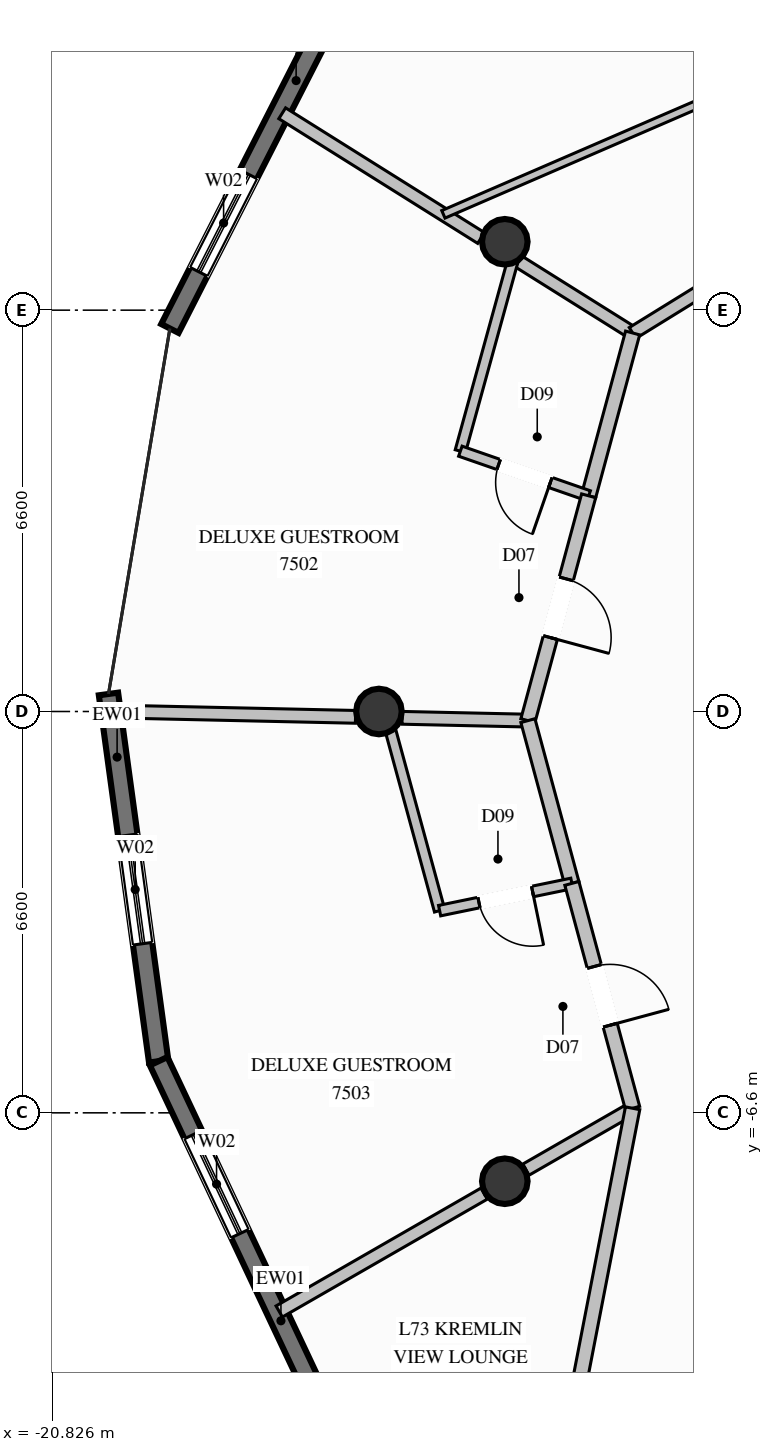
"""IFC4 building model, lengths in metres.
Left out: names, types, materials, properties, quantities, classifications, styles, units other than length and angle.
Written with IfcOpenShell. Run it as: python <this file> out.ifc"""

import sys

from ifc_helpers import new_model, si_unit, direction, frame, frame_2d, origin, origin_2d, place, context, subcontext, project, spatial, rectangle, circle, extrude, element, fill, save


model = new_model("IFC4")
c1 = context("Model", 3, precision=1e-05, world=origin(), true_north=direction((0.0, 1.0)))
c2 = subcontext(c1, "Body", "Model", "MODEL_VIEW")
j1 = project(units=[si_unit("LENGTHUNIT", "METRE"), si_unit("PLANEANGLEUNIT", "RADIAN")], contexts=[c1])
p1 = place(None, origin())
s1 = spatial("IfcSite", under=j1, at=p1, CompositionType="ELEMENT")
p2 = place(p1, origin())
s2 = spatial("IfcBuilding", under=s1, at=p2, CompositionType="ELEMENT")
p3 = place(p2, frame((0.0, 0.0, 282.0)))
s3 = spatial("IfcBuildingStorey", under=s2, at=p3, CompositionType="ELEMENT", Elevation=282.0)
for number, where, z_axis, x_axis in (
    (1, (-13.38, 7.725, 0.0), (0.0, 0.0, 1.0), (1.0, 0.0, 0.0)),
    (2, (-15.45, 0.0, 0.0), (0.0, 0.0, 1.0), (1.0, 0.0, 0.0)),
    (3, (-13.38, -7.725, 0.0), (0.0, 0.0, 1.0), (1.0, 0.0, 0.0)),
):
    element("IfcColumn", number, at=place(p3, frame(where, z_axis=z_axis, x_axis=x_axis)), inside=s3, PredefinedType="COLUMN", context=c2, shape_type="SweptSolid", body=[
        extrude(circle(Radius=0.375, at=origin_2d()), origin(), (0.0, 0.0, 1.0), 3.8),
    ])
p4 = place(p3, frame((-18.888, 6.299, 0.0), z_axis=(0.0, 0.0, 1.0), x_axis=(0.453783790234, 0.891111817743, 0.0)))
e4 = element("IfcWall", 4, at=p4, inside=s3, PredefinedType="SOLIDWALL", context=c2, shape_type="SweptSolid", body=[
    extrude(rectangle(XDim=6.053, YDim=0.32, at=frame_2d((3.027, 0.0))), origin(), (0.0, 0.0, 1.0), 3.57),
])
p5 = place(p4, frame((1.046, 0.0, 0.35)))
e5 = element("IfcOpeningElement", 5, at=p5, cuts=e4, PredefinedType="OPENING", context=c2, shape_type="SweptSolid", body=[
    extrude(rectangle(XDim=1.8, YDim=2.6, at=frame_2d((0.9, 1.3))), frame((0.0, 0.17, 0.0), z_axis=(0.0, -1.0, 0.0), x_axis=(1.0, 0.0, 0.0)), (0.0, 0.0, 1.0), 0.34),
])
p6 = place(p3, frame((-19.073, -5.751, 0.0), z_axis=(0.0, 0.0, 1.0), x_axis=(-0.135345568291, 0.990798454351, 0.0)))
e6 = element("IfcWall", 6, at=p6, inside=s3, PredefinedType="SOLIDWALL", context=c2, shape_type="SweptSolid", body=[
    extrude(rectangle(XDim=6.095, YDim=0.32, at=frame_2d((3.048, 0.0))), origin(), (0.0, 0.0, 1.0), 3.57),
])
p7 = place(p6, frame((1.95, 0.0, 0.35)))
e7 = element("IfcOpeningElement", 7, at=p7, cuts=e6, PredefinedType="OPENING", context=c2, shape_type="SweptSolid", body=[
    extrude(rectangle(XDim=1.8, YDim=2.6, at=frame_2d((0.9, 1.3))), frame((0.0, 0.17, 0.0), z_axis=(0.0, -1.0, 0.0), x_axis=(1.0, 0.0, 0.0)), (0.0, 0.0, 1.0), 0.34),
])
p8 = place(p3, frame((-16.493, -11.227, 0.0), z_axis=(0.0, 0.0, 1.0), x_axis=(-0.4262165229, 0.904621177956, 0.0)))
e8 = element("IfcWall", 8, at=p8, inside=s3, PredefinedType="SOLIDWALL", context=c2, shape_type="SweptSolid", body=[
    extrude(rectangle(XDim=6.053, YDim=0.32, at=frame_2d((3.027, 0.0))), origin(), (0.0, 0.0, 1.0), 3.57),
])
p9 = place(p8, frame((2.919, 0.0, 0.35)))
e9 = element("IfcOpeningElement", 9, at=p9, cuts=e8, PredefinedType="OPENING", context=c2, shape_type="SweptSolid", body=[
    extrude(rectangle(XDim=1.8, YDim=2.6, at=frame_2d((0.9, 1.3))), frame((0.0, 0.17, 0.0), z_axis=(0.0, -1.0, 0.0), x_axis=(1.0, 0.0, 0.0)), (0.0, 0.0, 1.0), 0.34),
])
p10 = place(p3, frame((-11.278, 6.225, 0.0), z_axis=(0.0, 0.0, 1.0), x_axis=(-0.847328563413, 0.531069021525, 0.0)))
e10 = element("IfcWall", 10, at=p10, inside=s3, PredefinedType="PARTITIONING", context=c2, shape_type="SweptSolid", body=[
    extrude(rectangle(XDim=2.214, YDim=0.21, at=frame_2d((1.107, 0.0))), origin(), (0.0, 0.0, 1.0), 3.085),
])
p11 = place(p3, frame((-13.77, 7.787, 0.0), z_axis=(0.0, 0.0, 1.0), x_axis=(-0.847251407525, 0.531192105031, 0.0)))
e11 = element("IfcWall", 11, at=p11, inside=s3, PredefinedType="PARTITIONING", context=c2, shape_type="SweptSolid", body=[
    extrude(rectangle(XDim=3.861, YDim=0.21, at=frame_2d((1.93, 0.0))), origin(), (0.0, 0.0, 1.0), 3.57),
])
p12 = place(p3, frame((-13.0, -0.15, 0.0), z_axis=(0.0, 0.0, 1.0), x_axis=(-0.999754050443, 0.022177434983, 0.0)))
e12 = element("IfcWall", 12, at=p12, inside=s3, PredefinedType="PARTITIONING", context=c2, shape_type="SweptSolid", body=[
    extrude(rectangle(XDim=2.07, YDim=0.21, at=frame_2d((1.035, 0.0))), origin(), (0.0, 0.0, 1.0), 3.57),
])
p13 = place(p3, frame((-15.835, -0.088, 0.0), z_axis=(0.0, 0.0, 1.0), x_axis=(-0.999756763109, 0.022054809407, 0.0)))
e13 = element("IfcWall", 13, at=p13, inside=s3, PredefinedType="PARTITIONING", context=c2, shape_type="SweptSolid", body=[
    extrude(rectangle(XDim=3.985, YDim=0.21, at=frame_2d((1.993, 0.0))), origin(), (0.0, 0.0, 1.0), 3.57),
])
p14 = place(p3, frame((-11.278, -6.525, 0.0), z_axis=(0.0, 0.0, 1.0), x_axis=(-0.866822958738, -0.498616042867, 0.0)))
e14 = element("IfcWall", 14, at=p14, inside=s3, PredefinedType="PARTITIONING", context=c2, shape_type="SweptSolid", body=[
    extrude(rectangle(XDim=2.026, YDim=0.21, at=frame_2d((1.013, 0.0))), origin(), (0.0, 0.0, 1.0), 3.085),
])
p15 = place(p3, frame((-13.719, -7.928, 0.0), z_axis=(0.0, 0.0, 1.0), x_axis=(-0.866841187991, -0.49858435074, 0.0)))
e15 = element("IfcWall", 15, at=p15, inside=s3, PredefinedType="PARTITIONING", context=c2, shape_type="SweptSolid", body=[
    extrude(rectangle(XDim=3.889, YDim=0.21, at=frame_2d((1.944, 0.0))), origin(), (0.0, 0.0, 1.0), 3.57),
])
p16 = place(p3, frame((-11.278, 6.225, 0.0), z_axis=(0.0, 0.0, 1.0), x_axis=(0.85092385233, 0.525289060933, 0.0)))
e16 = element("IfcWall", 16, at=p16, inside=s3, PredefinedType="PARTITIONING", context=c2, shape_type="SweptSolid", body=[
    extrude(rectangle(XDim=4.616, YDim=0.21, at=frame_2d((2.308, 0.0))), origin(), (0.0, 0.0, 1.0), 3.57),
])
p17 = place(p3, frame((-14.39, 8.176, 0.0), z_axis=(0.0, 0.0, 1.0), x_axis=(0.917754899872, 0.397147257022, 0.0)))
e17 = element("IfcWall", 17, at=p17, inside=s3, PredefinedType="PARTITIONING", context=c2, shape_type="SweptSolid", body=[
    extrude(rectangle(XDim=15.679, YDim=0.135, at=frame_2d((7.84, 0.0))), origin(), (0.0, 0.0, 1.0), 3.57),
])
p18 = place(p17, frame((7.365, 0.0, 0.0)))
e18 = element("IfcOpeningElement", 18, at=p18, cuts=e17, PredefinedType="OPENING", context=c2, shape_type="SweptSolid", body=[
    extrude(rectangle(XDim=0.95, YDim=2.1, at=frame_2d((0.475, 1.05))), frame((0.0, 0.078, 0.0), z_axis=(0.0, -1.0, 0.0), x_axis=(1.0, 0.0, 0.0)), (0.0, 0.0, 1.0), 0.155),
])
p19 = place(p3, frame((-11.278, 6.225, 0.0), z_axis=(0.0, 0.0, 1.0), x_axis=(-0.260614169726, -0.965443035367, 0.0)))
e19 = element("IfcWall", 19, at=p19, inside=s3, PredefinedType="PARTITIONING", context=c2, shape_type="SweptSolid", body=[
    extrude(rectangle(XDim=2.774, YDim=0.24, at=frame_2d((1.387, 0.0))), origin(), (0.0, 0.0, 1.0), 3.57),
])
p20 = place(p3, frame((-13.237, 7.453, 0.0), z_axis=(0.0, 0.0, 1.0), x_axis=(-0.265653158595, -0.964068669405, 0.0)))
e20 = element("IfcWall", 20, at=p20, inside=s3, PredefinedType="PLUMBINGWALL", context=c2, shape_type="SweptSolid", body=[
    extrude(rectangle(XDim=3.29, YDim=0.175, at=frame_2d((1.645, 0.0))), origin(), (0.0, 0.0, 1.0), 3.137),
])
p21 = place(p3, frame((-12.001, 3.547, 0.0), z_axis=(0.0, 0.0, 1.0), x_axis=(-0.944505641949, 0.328495193764, 0.0)))
e21 = element("IfcWall", 21, at=p21, inside=s3, PredefinedType="PLUMBINGWALL", context=c2, shape_type="SweptSolid", body=[
    extrude(rectangle(XDim=2.234, YDim=0.175, at=frame_2d((1.117, 0.0))), origin(), (0.0, 0.0, 1.0), 3.57),
])
p22 = place(p21, frame((0.667, 0.0, 0.0)))
e22 = element("IfcOpeningElement", 22, at=p22, cuts=e21, PredefinedType="OPENING", context=c2, shape_type="SweptSolid", body=[
    extrude(rectangle(XDim=0.9, YDim=2.1, at=frame_2d((0.45, 1.05))), frame((0.0, 0.098, 0.0), z_axis=(0.0, -1.0, 0.0), x_axis=(1.0, 0.0, 0.0)), (0.0, 0.0, 1.0), 0.195),
])
p23 = place(p3, frame((-12.001, 3.547, 0.0), z_axis=(0.0, 0.0, 1.0), x_axis=(-0.260867276747, -0.96537467541, 0.0)))
e23 = element("IfcWall", 23, at=p23, inside=s3, PredefinedType="PARTITIONING", context=c2, shape_type="SweptSolid", body=[
    extrude(rectangle(XDim=3.83, YDim=0.24, at=frame_2d((1.915, 0.0))), origin(), (0.0, 0.0, 1.0), 3.57),
])
p24 = place(p23, frame((1.415, 0.0, 0.0)))
e24 = element("IfcOpeningElement", 24, at=p24, cuts=e23, PredefinedType="OPENING", context=c2, shape_type="SweptSolid", body=[
    extrude(rectangle(XDim=1.0, YDim=2.2, at=frame_2d((0.5, 1.1))), frame((0.0, 0.13, 0.0), z_axis=(0.0, -1.0, 0.0), x_axis=(1.0, 0.0, 0.0)), (0.0, 0.0, 1.0), 0.26),
])
p25 = place(p3, frame((-13.0, -0.15, 0.0), z_axis=(0.0, 0.0, 1.0), x_axis=(0.260702780503, -0.965419111183, 0.0)))
e25 = element("IfcWall", 25, at=p25, inside=s3, PredefinedType="PARTITIONING", context=c2, shape_type="SweptSolid", body=[
    extrude(rectangle(XDim=2.773, YDim=0.24, at=frame_2d((1.386, 0.0))), origin(), (0.0, 0.0, 1.0), 3.57),
])
p26 = place(p3, frame((-15.318, -0.099, 0.0), z_axis=(0.0, 0.0, 1.0), x_axis=(0.263142508188, -0.964756974779, 0.0)))
e26 = element("IfcWall", 26, at=p26, inside=s3, PredefinedType="PLUMBINGWALL", context=c2, shape_type="SweptSolid", body=[
    extrude(rectangle(XDim=3.292, YDim=0.175, at=frame_2d((1.646, 0.0))), origin(), (0.0, 0.0, 1.0), 3.137),
])
p27 = place(p3, frame((-12.277, -2.827, 0.0), z_axis=(0.0, 0.0, 1.0), x_axis=(-0.979435321296, -0.201758398583, 0.0)))
e27 = element("IfcWall", 27, at=p27, inside=s3, PredefinedType="PLUMBINGWALL", context=c2, shape_type="SweptSolid", body=[
    extrude(rectangle(XDim=2.22, YDim=0.175, at=frame_2d((1.11, 0.0))), origin(), (0.0, 0.0, 1.0), 3.57),
])
p28 = place(p27, frame((0.66, 0.0, 0.0)))
e28 = element("IfcOpeningElement", 28, at=p28, cuts=e27, PredefinedType="OPENING", context=c2, shape_type="SweptSolid", body=[
    extrude(rectangle(XDim=0.9, YDim=2.1, at=frame_2d((0.45, 1.05))), frame((0.0, 0.098, 0.0), z_axis=(0.0, -1.0, 0.0), x_axis=(1.0, 0.0, 0.0)), (0.0, 0.0, 1.0), 0.195),
])
p29 = place(p3, frame((-12.277, -2.827, 0.0), z_axis=(0.0, 0.0, 1.0), x_axis=(0.260803073576, -0.965392022348, 0.0)))
e29 = element("IfcWall", 29, at=p29, inside=s3, PredefinedType="PARTITIONING", context=c2, shape_type="SweptSolid", body=[
    extrude(rectangle(XDim=3.831, YDim=0.24, at=frame_2d((1.915, 0.0))), origin(), (0.0, 0.0, 1.0), 3.57),
])
p30 = place(p29, frame((1.415, 0.0, 0.0)))
e30 = element("IfcOpeningElement", 30, at=p30, cuts=e29, PredefinedType="OPENING", context=c2, shape_type="SweptSolid", body=[
    extrude(rectangle(XDim=1.0, YDim=2.2, at=frame_2d((0.5, 1.1))), frame((0.0, 0.13, 0.0), z_axis=(0.0, -1.0, 0.0), x_axis=(1.0, 0.0, 0.0)), (0.0, 0.0, 1.0), 0.26),
])
p31 = place(p3, frame((-11.278, -6.525, 0.0), z_axis=(0.0, 0.0, 1.0), x_axis=(-0.190197086903, -0.981745928504, 0.0)))
e31 = element("IfcWall", 31, at=p31, inside=s3, PredefinedType="PARTITIONING", context=c2, shape_type="SweptSolid", body=[
    extrude(rectangle(XDim=5.373, YDim=0.24, at=frame_2d((2.687, 0.0))), origin(), (0.0, 0.0, 1.0), 3.57),
])
p32 = place(p5, origin())
e32 = element("IfcWindow", 32, at=p32, inside=s3, PartitioningType="SINGLE_PANEL", PredefinedType="WINDOW", context=c2, shape_type="SweptSolid", body=[
    extrude(rectangle(XDim=1.8, YDim=2.6, at=frame_2d((0.9, 1.3))), frame((0.0, 0.03, 0.0), z_axis=(0.0, -1.0, 0.0), x_axis=(1.0, 0.0, 0.0)), (0.0, 0.0, 1.0), 0.06),
])
fill(e5, e32)
p33 = place(p7, origin())
e33 = element("IfcWindow", 33, at=p33, inside=s3, PartitioningType="SINGLE_PANEL", PredefinedType="WINDOW", context=c2, shape_type="SweptSolid", body=[
    extrude(rectangle(XDim=1.8, YDim=2.6, at=frame_2d((0.9, 1.3))), frame((0.0, 0.03, 0.0), z_axis=(0.0, -1.0, 0.0), x_axis=(1.0, 0.0, 0.0)), (0.0, 0.0, 1.0), 0.06),
])
fill(e7, e33)
p34 = place(p9, origin())
e34 = element("IfcWindow", 34, at=p34, inside=s3, PartitioningType="SINGLE_PANEL", PredefinedType="WINDOW", context=c2, shape_type="SweptSolid", body=[
    extrude(rectangle(XDim=1.8, YDim=2.6, at=frame_2d((0.9, 1.3))), frame((0.0, 0.03, 0.0), z_axis=(0.0, -1.0, 0.0), x_axis=(1.0, 0.0, 0.0)), (0.0, 0.0, 1.0), 0.06),
])
fill(e9, e34)
p35 = place(p22, origin())
e35 = element("IfcDoor", 35, at=p35, inside=s3, OperationType="SINGLE_SWING_LEFT", PredefinedType="DOOR", context=c2, shape_type="SweptSolid", body=[
    extrude(rectangle(XDim=0.9, YDim=2.1, at=frame_2d((0.45, 1.05))), frame((0.0, 0.025, 0.0), z_axis=(0.0, -1.0, 0.0), x_axis=(1.0, 0.0, 0.0)), (0.0, 0.0, 1.0), 0.05),
])
fill(e22, e35)
p36 = place(p24, origin())
e36 = element("IfcDoor", 36, at=p36, inside=s3, OperationType="SINGLE_SWING_RIGHT", PredefinedType="DOOR", context=c2, shape_type="SweptSolid", body=[
    extrude(rectangle(XDim=1.0, YDim=2.2, at=frame_2d((0.5, 1.1))), frame((0.0, 0.025, 0.0), z_axis=(0.0, -1.0, 0.0), x_axis=(1.0, 0.0, 0.0)), (0.0, 0.0, 1.0), 0.05),
])
fill(e24, e36)
p37 = place(p28, origin())
e37 = element("IfcDoor", 37, at=p37, inside=s3, OperationType="SINGLE_SWING_LEFT", PredefinedType="DOOR", context=c2, shape_type="SweptSolid", body=[
    extrude(rectangle(XDim=0.9, YDim=2.1, at=frame_2d((0.45, 1.05))), frame((0.0, 0.025, 0.0), z_axis=(0.0, -1.0, 0.0), x_axis=(1.0, 0.0, 0.0)), (0.0, 0.0, 1.0), 0.05),
])
fill(e28, e37)
p38 = place(p30, origin())
e38 = element("IfcDoor", 38, at=p38, inside=s3, OperationType="SINGLE_SWING_RIGHT", PredefinedType="DOOR", context=c2, shape_type="SweptSolid", body=[
    extrude(rectangle(XDim=1.0, YDim=2.2, at=frame_2d((0.5, 1.1))), frame((0.0, 0.025, 0.0), z_axis=(0.0, -1.0, 0.0), x_axis=(1.0, 0.0, 0.0)), (0.0, 0.0, 1.0), 0.05),
])
fill(e30, e38)
save(model, sys.argv[1])
